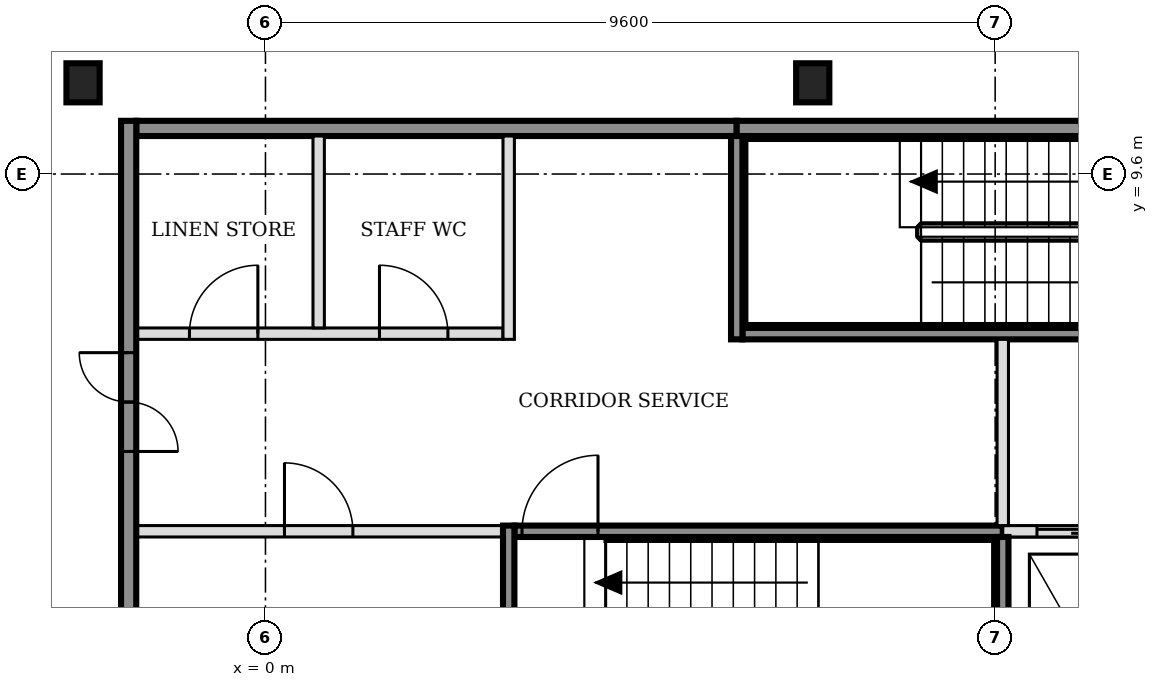
"""IFC4 building model, lengths in metres.
Left out: names, types, materials, properties, quantities, classifications, styles, units other than length and angle.
Written with IfcOpenShell. Run it as: python <this file> out.ifc"""

import sys

from ifc_helpers import new_model, si_unit, direction, frame, frame_2d, origin, origin_2d, place, context, subcontext, project, spatial, rectangle, i_section, extrude, element, fill, save


model = new_model("IFC4")
c1 = context("Model", 3, precision=1e-05, world=origin(), true_north=direction((0.0, 1.0)))
c2 = subcontext(c1, "Body", "Model", "MODEL_VIEW")
j1 = project(units=[si_unit("LENGTHUNIT", "METRE"), si_unit("PLANEANGLEUNIT", "RADIAN")], contexts=[c1])
p1 = place(None, origin())
s1 = spatial("IfcSite", under=j1, at=p1, CompositionType="ELEMENT")
p2 = place(p1, origin())
s2 = spatial("IfcBuilding", under=s1, at=p2, CompositionType="ELEMENT")
p3 = place(p2, frame((0.0, 0.0, 87.0)))
s3 = spatial("IfcBuildingStorey", under=s2, at=p3, CompositionType="ELEMENT", Elevation=87.0)
for number, where, z_axis, x_axis in (
    (1, (-2.4, 10.8, -0.15), (0.0, 0.0, 1.0), (1.0, 0.0, 0.0)),
    (2, (7.2, 10.8, -0.15), (0.0, 0.0, 1.0), (1.0, 0.0, 0.0)),
):
    element("IfcColumn", number, at=place(p3, frame(where, z_axis=z_axis, x_axis=x_axis)), inside=s3, PredefinedType="COLUMN", context=c2, shape_type="SweptSolid", body=[
        extrude(i_section(OverallWidth=0.437, OverallDepth=0.514, WebThickness=0.061, FlangeThickness=0.097, FilletRadius=0.015, at=origin_2d()), origin(), (0.0, 0.0, 1.0), 3.6),
    ])
p4 = place(p3, frame((-1.7, 4.9, 0.0), z_axis=(0.0, 0.0, 1.0), x_axis=(1.0, 0.0, 0.0)))
e3 = element("IfcWall", 3, at=p4, inside=s3, PredefinedType="PARTITIONING", context=c2, shape_type="SweptSolid", body=[
    extrude(rectangle(XDim=4.825, YDim=0.15, at=frame_2d((2.413, 0.0))), origin(), (0.0, 0.0, 1.0), 3.45),
])
p5 = place(p4, frame((1.95, 0.0, 0.0)))
e4 = element("IfcOpeningElement", 4, at=p5, cuts=e3, PredefinedType="OPENING", context=c2, shape_type="SweptSolid", body=[
    extrude(rectangle(XDim=0.9, YDim=2.1, at=frame_2d((0.45, 1.05))), frame((0.0, 0.085, 0.0), z_axis=(0.0, -1.0, 0.0), x_axis=(1.0, 0.0, 0.0)), (0.0, 0.0, 1.0), 0.17),
])
p6 = place(p3, frame((3.275, 4.9, 0.0), z_axis=(0.0, 0.0, 1.0), x_axis=(1.0, 0.0, 0.0)))
e5 = element("IfcWall", 5, at=p6, inside=s3, PredefinedType="SOLIDWALL", context=c2, shape_type="SweptSolid", body=[
    extrude(rectangle(XDim=6.425, YDim=0.15, at=frame_2d((3.212, 0.0))), origin(), (0.0, 0.0, 1.0), 3.45),
])
p7 = place(p6, frame((0.1, 0.0, 0.0)))
e6 = element("IfcOpeningElement", 6, at=p7, cuts=e5, PredefinedType="OPENING", context=c2, shape_type="SweptSolid", body=[
    extrude(rectangle(XDim=1.0, YDim=2.1, at=frame_2d((0.5, 1.05))), frame((0.0, 0.085, 0.0), z_axis=(0.0, -1.0, 0.0), x_axis=(1.0, 0.0, 0.0)), (0.0, 0.0, 1.0), 0.17),
])
p8 = place(p3, frame((9.7, 4.9, 0.0), z_axis=(0.0, 0.0, 1.0), x_axis=(1.0, 0.0, 0.0)))
e7 = element("IfcWall", 7, at=p8, inside=s3, PredefinedType="SOLIDWALL", context=c2, shape_type="SweptSolid", body=[
    extrude(rectangle(XDim=6.4, YDim=0.15, at=frame_2d((3.2, 0.0))), origin(), (0.0, 0.0, 1.0), 3.45),
])
p9 = place(p8, frame((0.45, 0.0, 0.0)))
e8 = element("IfcOpeningElement", 8, at=p9, cuts=e7, PredefinedType="OPENING", context=c2, shape_type="SweptSolid", body=[
    extrude(rectangle(XDim=1.0, YDim=2.1, at=frame_2d((0.5, 1.05))), frame((0.0, 0.085, 0.0), z_axis=(0.0, -1.0, 0.0), x_axis=(1.0, 0.0, 0.0)), (0.0, 0.0, 1.0), 0.17),
])
p10 = place(p8, frame((2.35, 0.0, 0.0)))
e9 = element("IfcOpeningElement", 9, at=p10, cuts=e7, PredefinedType="OPENING", context=c2, shape_type="SweptSolid", body=[
    extrude(rectangle(XDim=1.0, YDim=2.1, at=frame_2d((0.5, 1.05))), frame((0.0, 0.085, 0.0), z_axis=(0.0, -1.0, 0.0), x_axis=(1.0, 0.0, 0.0)), (0.0, 0.0, 1.0), 0.17),
])
p11 = place(p8, frame((4.7, 0.0, 0.0)))
e10 = element("IfcOpeningElement", 10, at=p11, cuts=e7, PredefinedType="OPENING", context=c2, shape_type="SweptSolid", body=[
    extrude(rectangle(XDim=0.9, YDim=2.1, at=frame_2d((0.45, 1.05))), frame((0.0, 0.085, 0.0), z_axis=(0.0, -1.0, 0.0), x_axis=(1.0, 0.0, 0.0)), (0.0, 0.0, 1.0), 0.17),
])
p12 = place(p3, frame((-1.7, 7.5, 0.0), z_axis=(0.0, 0.0, 1.0), x_axis=(1.0, 0.0, 0.0)))
e11 = element("IfcWall", 11, at=p12, inside=s3, PredefinedType="PARTITIONING", context=c2, shape_type="SweptSolid", body=[
    extrude(rectangle(XDim=4.825, YDim=0.15, at=frame_2d((2.413, 0.0))), origin(), (0.0, 0.0, 1.0), 3.45),
])
p13 = place(p12, frame((0.7, 0.0, 0.0)))
e12 = element("IfcOpeningElement", 12, at=p13, cuts=e11, PredefinedType="OPENING", context=c2, shape_type="SweptSolid", body=[
    extrude(rectangle(XDim=0.9, YDim=2.1, at=frame_2d((0.45, 1.05))), frame((0.0, 0.085, 0.0), z_axis=(0.0, -1.0, 0.0), x_axis=(1.0, 0.0, 0.0)), (0.0, 0.0, 1.0), 0.17),
])
p14 = place(p12, frame((3.2, 0.0, 0.0)))
e13 = element("IfcOpeningElement", 13, at=p14, cuts=e11, PredefinedType="OPENING", context=c2, shape_type="SweptSolid", body=[
    extrude(rectangle(XDim=0.9, YDim=2.1, at=frame_2d((0.45, 1.05))), frame((0.0, 0.085, 0.0), z_axis=(0.0, -1.0, 0.0), x_axis=(1.0, 0.0, 0.0)), (0.0, 0.0, 1.0), 0.17),
])
p15 = place(p3, frame((6.275, 7.5, 0.0), z_axis=(0.0, 0.0, 1.0), x_axis=(1.0, 0.0, 0.0)))
e14 = element("IfcWall", 14, at=p15, inside=s3, PredefinedType="SOLIDWALL", context=c2, shape_type="SweptSolid", body=[
    extrude(rectangle(XDim=6.425, YDim=0.15, at=frame_2d((3.212, 0.0))), origin(), (0.0, 0.0, 1.0), 3.45),
])
p16 = place(p15, frame((5.225, 0.0, 0.0)))
e15 = element("IfcOpeningElement", 15, at=p16, cuts=e14, PredefinedType="OPENING", context=c2, shape_type="SweptSolid", body=[
    extrude(rectangle(XDim=1.0, YDim=2.1, at=frame_2d((0.5, 1.05))), frame((0.0, 0.085, 0.0), z_axis=(0.0, -1.0, 0.0), x_axis=(1.0, 0.0, 0.0)), (0.0, 0.0, 1.0), 0.17),
])
p17 = place(p3, frame((-1.7, 10.2, 0.0), z_axis=(0.0, 0.0, 1.0), x_axis=(1.0, 0.0, 0.0)))
e16 = element("IfcWall", 16, at=p17, inside=s3, PredefinedType="SOLIDWALL", context=c2, shape_type="SweptSolid", body=[
    extrude(rectangle(XDim=7.9, YDim=0.2, at=frame_2d((3.95, 0.0))), origin(), (0.0, 0.0, 1.0), 3.45),
])
p18 = place(p3, frame((6.2, 10.2, 0.0), z_axis=(0.0, 0.0, 1.0), x_axis=(1.0, 0.0, 0.0)))
e17 = element("IfcWall", 17, at=p18, inside=s3, PredefinedType="SOLIDWALL", context=c2, shape_type="SweptSolid", body=[
    extrude(rectangle(XDim=6.5, YDim=0.2, at=frame_2d((3.25, 0.0))), origin(), (0.0, 0.0, 1.0), 3.45),
])
p19 = place(p3, frame((-1.8, -5.5, 0.0), z_axis=(0.0, 0.0, 1.0), x_axis=(0.0, 1.0, 0.0)))
e18 = element("IfcWall", 18, at=p19, inside=s3, PredefinedType="SOLIDWALL", context=c2, shape_type="SweptSolid", body=[
    extrude(rectangle(XDim=15.8, YDim=0.2, at=frame_2d((7.9, 0.0))), origin(), (0.0, 0.0, 1.0), 3.45),
])
p20 = place(p19, frame((3.05, 0.0, 0.0)))
e19 = element("IfcOpeningElement", 19, at=p20, cuts=e18, PredefinedType="OPENING", context=c2, shape_type="SweptSolid", body=[
    extrude(rectangle(XDim=1.3, YDim=2.1, at=frame_2d((0.65, 1.05))), frame((0.0, 0.11, 0.0), z_axis=(0.0, -1.0, 0.0), x_axis=(1.0, 0.0, 0.0)), (0.0, 0.0, 1.0), 0.22),
])
p21 = place(p19, frame((11.45, 0.0, 0.0)))
e20 = element("IfcOpeningElement", 20, at=p21, cuts=e18, PredefinedType="OPENING", context=c2, shape_type="SweptSolid", body=[
    extrude(rectangle(XDim=1.3, YDim=2.1, at=frame_2d((0.65, 1.05))), frame((0.0, 0.11, 0.0), z_axis=(0.0, -1.0, 0.0), x_axis=(1.0, 0.0, 0.0)), (0.0, 0.0, 1.0), 0.22),
])
p22 = place(p3, frame((0.7, 7.575, 0.0), z_axis=(0.0, 0.0, 1.0), x_axis=(0.0, 1.0, 0.0)))
e21 = element("IfcWall", 21, at=p22, inside=s3, PredefinedType="PARTITIONING", context=c2, shape_type="SweptSolid", body=[
    extrude(rectangle(XDim=2.525, YDim=0.15, at=frame_2d((1.263, 0.0))), origin(), (0.0, 0.0, 1.0), 3.45),
])
p23 = place(p3, frame((3.2, 2.275, 0.0), z_axis=(0.0, 0.0, 1.0), x_axis=(0.0, 1.0, 0.0)))
e22 = element("IfcWall", 22, at=p23, inside=s3, PredefinedType="SOLIDWALL", context=c2, shape_type="SweptSolid", body=[
    extrude(rectangle(XDim=2.7, YDim=0.15, at=frame_2d((1.35, 0.0))), origin(), (0.0, 0.0, 1.0), 3.45),
])
p24 = place(p3, frame((3.2, 7.425, 0.0), z_axis=(0.0, 0.0, 1.0), x_axis=(0.0, 1.0, 0.0)))
e23 = element("IfcWall", 23, at=p24, inside=s3, PredefinedType="PARTITIONING", context=c2, shape_type="SweptSolid", body=[
    extrude(rectangle(XDim=2.675, YDim=0.15, at=frame_2d((1.337, 0.0))), origin(), (0.0, 0.0, 1.0), 3.45),
])
p25 = place(p3, frame((6.2, 7.425, 0.0), z_axis=(0.0, 0.0, 1.0), x_axis=(0.0, 1.0, 0.0)))
e24 = element("IfcWall", 24, at=p25, inside=s3, PredefinedType="SOLIDWALL", context=c2, shape_type="SweptSolid", body=[
    extrude(rectangle(XDim=2.675, YDim=0.15, at=frame_2d((1.337, 0.0))), origin(), (0.0, 0.0, 1.0), 3.45),
])
p26 = place(p3, frame((9.7, 2.275, 0.0), z_axis=(0.0, 0.0, 1.0), x_axis=(0.0, 1.0, 0.0)))
e25 = element("IfcWall", 25, at=p26, inside=s3, PredefinedType="SOLIDWALL", context=c2, shape_type="SweptSolid", body=[
    extrude(rectangle(XDim=2.55, YDim=0.15, at=frame_2d((1.275, 0.0))), origin(), (0.0, 0.0, 1.0), 3.45),
])
p27 = place(p3, frame((9.7, 4.975, 0.0), z_axis=(0.0, 0.0, 1.0), x_axis=(0.0, 1.0, 0.0)))
e26 = element("IfcWall", 26, at=p27, inside=s3, PredefinedType="SOLIDWALL", context=c2, shape_type="SweptSolid", body=[
    extrude(rectangle(XDim=2.45, YDim=0.15, at=frame_2d((1.225, 0.0))), origin(), (0.0, 0.0, 1.0), 3.45),
])
p28 = place(p9, origin())
e27 = element("IfcDoor", 27, at=p28, inside=s3, OperationType="DOUBLE_DOOR_SLIDING", PredefinedType="DOOR", context=c2, shape_type="SweptSolid", body=[
    extrude(rectangle(XDim=1.0, YDim=2.1, at=frame_2d((0.5, 1.05))), frame((0.0, 0.025, 0.0), z_axis=(0.0, -1.0, 0.0), x_axis=(1.0, 0.0, 0.0)), (0.0, 0.0, 1.0), 0.05),
])
fill(e8, e27)
p29 = place(p7, origin())
e28 = element("IfcDoor", 28, at=p29, inside=s3, OperationType="SINGLE_SWING_RIGHT", PredefinedType="DOOR", context=c2, shape_type="SweptSolid", body=[
    extrude(rectangle(XDim=1.0, YDim=2.1, at=frame_2d((0.5, 1.05))), frame((0.0, 0.025, 0.0), z_axis=(0.0, -1.0, 0.0), x_axis=(1.0, 0.0, 0.0)), (0.0, 0.0, 1.0), 0.05),
])
fill(e6, e28)
p30 = place(p21, origin())
e29 = element("IfcDoor", 29, at=p30, inside=s3, OperationType="DOUBLE_DOOR_SINGLE_SWING", PredefinedType="DOOR", context=c2, shape_type="SweptSolid", body=[
    extrude(rectangle(XDim=1.3, YDim=2.1, at=frame_2d((0.65, 1.05))), frame((0.0, 0.025, 0.0), z_axis=(0.0, -1.0, 0.0), x_axis=(1.0, 0.0, 0.0)), (0.0, 0.0, 1.0), 0.05),
])
fill(e20, e29)
p31 = place(p5, origin())
e30 = element("IfcDoor", 30, at=p31, inside=s3, OperationType="SINGLE_SWING_LEFT", PredefinedType="DOOR", context=c2, shape_type="SweptSolid", body=[
    extrude(rectangle(XDim=0.9, YDim=2.1, at=frame_2d((0.45, 1.05))), frame((0.0, 0.025, 0.0), z_axis=(0.0, -1.0, 0.0), x_axis=(1.0, 0.0, 0.0)), (0.0, 0.0, 1.0), 0.05),
])
fill(e4, e30)
p32 = place(p13, origin())
e31 = element("IfcDoor", 31, at=p32, inside=s3, OperationType="SINGLE_SWING_RIGHT", PredefinedType="DOOR", context=c2, shape_type="SweptSolid", body=[
    extrude(rectangle(XDim=0.9, YDim=2.1, at=frame_2d((0.45, 1.05))), frame((0.0, 0.025, 0.0), z_axis=(0.0, -1.0, 0.0), x_axis=(1.0, 0.0, 0.0)), (0.0, 0.0, 1.0), 0.05),
])
fill(e12, e31)
p33 = place(p14, origin())
e32 = element("IfcDoor", 32, at=p33, inside=s3, OperationType="SINGLE_SWING_LEFT", PredefinedType="DOOR", context=c2, shape_type="SweptSolid", body=[
    extrude(rectangle(XDim=0.9, YDim=2.1, at=frame_2d((0.45, 1.05))), frame((0.0, 0.025, 0.0), z_axis=(0.0, -1.0, 0.0), x_axis=(1.0, 0.0, 0.0)), (0.0, 0.0, 1.0), 0.05),
])
fill(e13, e32)
save(model, sys.argv[1])
